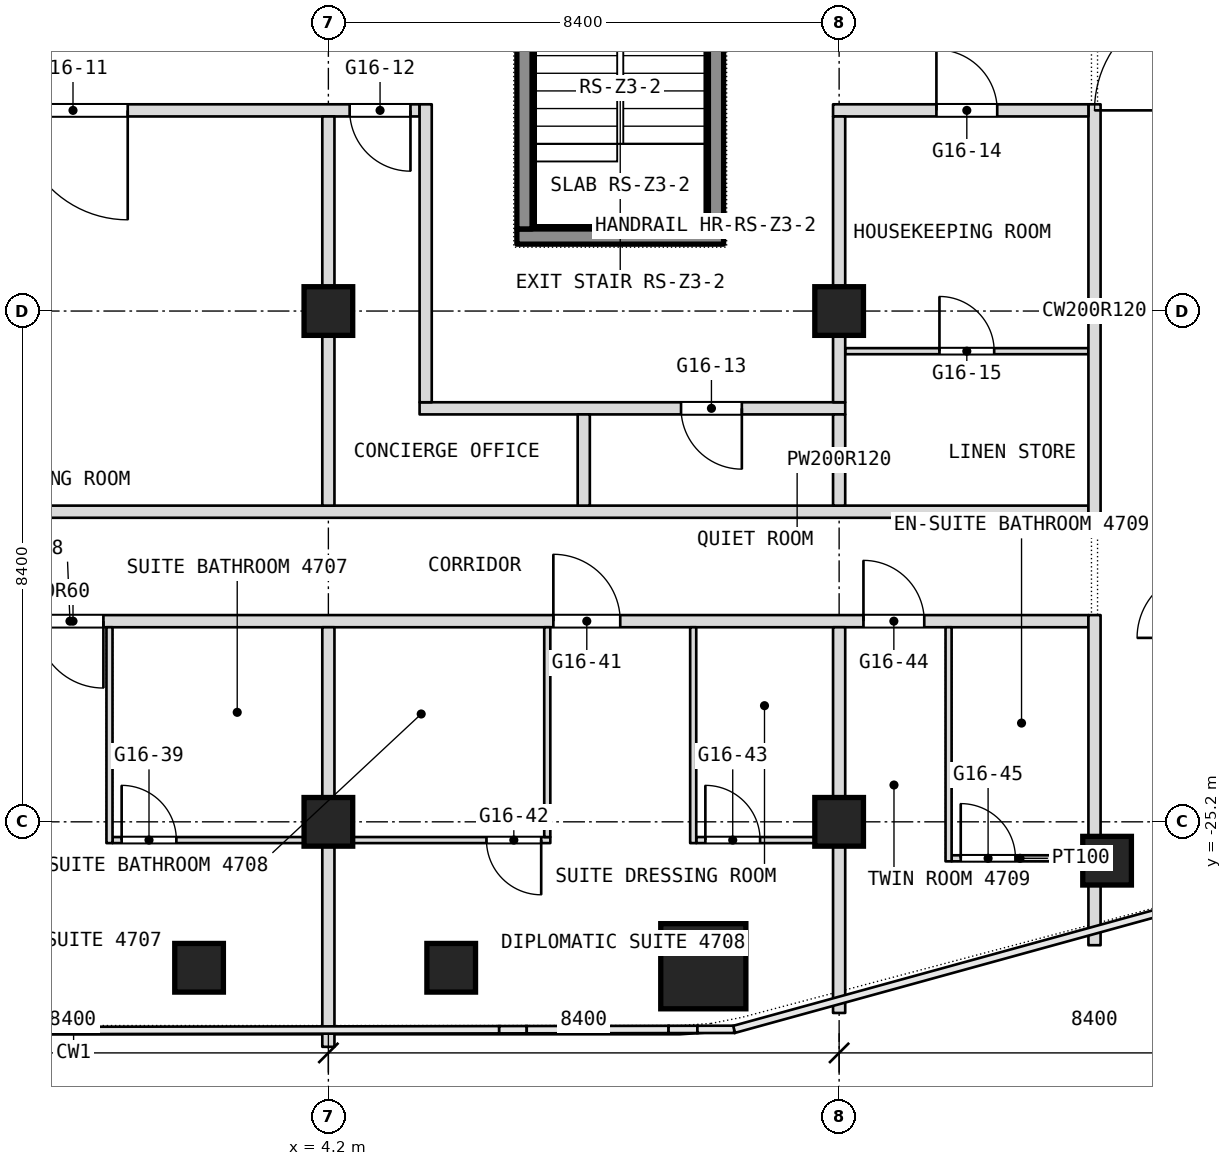
"""IFC4 building model, lengths in metres.
Left out: names, types, materials, properties, quantities, classifications, styles, units other than length and angle.
Written with IfcOpenShell. Run it as: python <this file> out.ifc"""

import sys

from ifc_helpers import new_model, si_unit, direction, frame, frame_2d, origin, origin_2d, place, context, subcontext, project, spatial, rectangle, extrude, element, fill, save


model = new_model("IFC4")
c1 = context("Model", 3, precision=1e-05, world=origin(), true_north=direction((0.0, 1.0)))
c2 = subcontext(c1, "Body", "Model", "MODEL_VIEW")
j1 = project(units=[si_unit("LENGTHUNIT", "METRE"), si_unit("PLANEANGLEUNIT", "RADIAN")], contexts=[c1])
p1 = place(None, origin())
s1 = spatial("IfcSite", under=j1, at=p1, CompositionType="ELEMENT")
p2 = place(p1, origin())
s2 = spatial("IfcBuilding", under=s1, at=p2, CompositionType="ELEMENT")
p3 = place(p2, frame((0.0, 0.0, 205.7)))
s3 = spatial("IfcBuildingStorey", under=s2, at=p3, CompositionType="ELEMENT", Elevation=205.7)
p4 = place(p3, frame((10.366, -27.575, 0.0), z_axis=(0.0, 0.0, 1.0), x_axis=(1.0, 0.0, 0.0)))
e1 = element("IfcColumn", 1, at=p4, inside=s3, PredefinedType="COLUMN", context=c2, shape_type="SweptSolid", body=[
    extrude(rectangle(XDim=1.4, YDim=1.4, at=origin_2d()), origin(), (0.0, 0.0, 1.0), 3.6),
])
for number, where, z_axis, x_axis in (
    (2, (4.2, -25.2, 0.0), (0.0, 0.0, 1.0), (1.0, 0.0, 0.0)),
    (3, (4.2, -16.8, 0.0), (0.0, 0.0, 1.0), (1.0, 0.0, 0.0)),
    (4, (12.6, -25.2, 0.0), (0.0, 0.0, 1.0), (1.0, 0.0, 0.0)),
    (5, (12.6, -16.8, 0.0), (0.0, 0.0, 1.0), (1.0, 0.0, 0.0)),
    (6, (17.007, -25.839, 0.0), (0.0, 0.0, 1.0), (1.0, 0.0, 0.0)),
    (7, (6.22, -27.6, 0.0), (0.0, 0.0, 1.0), (1.0, 0.0, 0.0)),
    (8, (2.073, -27.6, 0.0), (0.0, 0.0, 1.0), (1.0, 0.0, 0.0)),
):
    element("IfcColumn", number, at=place(p3, frame(where, z_axis=z_axis, x_axis=x_axis)), inside=s3, PredefinedType="COLUMN", context=c2, shape_type="SweptSolid", body=[
        extrude(rectangle(XDim=0.8, YDim=0.8, at=origin_2d()), origin(), (0.0, 0.0, 1.0), 3.6),
    ])
p5 = place(p3, frame((14.45, -25.8, 0.0), z_axis=(0.0, 0.0, 1.0), x_axis=(1.0, 0.0, 0.0)))
e9 = element("IfcWall", 9, at=p5, inside=s3, PredefinedType="PARTITIONING", context=c2, shape_type="SweptSolid", body=[
    extrude(rectangle(XDim=2.25, YDim=0.1, at=frame_2d((1.125, 0.0))), origin(), (0.0, 0.0, 1.0), 3.34),
])
p6 = place(p5, frame((0.15, 0.0, 0.0)))
e10 = element("IfcOpeningElement", 10, at=p6, cuts=e9, PredefinedType="OPENING", context=c2, shape_type="SweptSolid", body=[
    extrude(rectangle(XDim=0.9, YDim=2.1, at=frame_2d((0.45, 1.05))), frame((0.0, 0.05, 0.0), z_axis=(0.0, -1.0, 0.0), x_axis=(1.0, 0.0, 0.0)), (0.0, 0.0, 1.0), 0.1),
])
p7 = place(p3, frame((0.65, -25.5, 0.0), z_axis=(0.0, 0.0, 1.0), x_axis=(1.0, 0.0, 0.0)))
e11 = element("IfcWall", 11, at=p7, inside=s3, PredefinedType="PARTITIONING", context=c2, shape_type="SweptSolid", body=[
    extrude(rectangle(XDim=7.2, YDim=0.1, at=frame_2d((3.6, 0.0))), origin(), (0.0, 0.0, 1.0), 3.34),
])
p8 = place(p7, frame((0.15, 0.0, 0.0)))
e12 = element("IfcOpeningElement", 12, at=p8, cuts=e11, PredefinedType="OPENING", context=c2, shape_type="SweptSolid", body=[
    extrude(rectangle(XDim=0.9, YDim=2.1, at=frame_2d((0.45, 1.05))), frame((0.0, 0.05, 0.0), z_axis=(0.0, -1.0, 0.0), x_axis=(1.0, 0.0, 0.0)), (0.0, 0.0, 1.0), 0.1),
])
p9 = place(p7, frame((6.15, 0.0, 0.0)))
e13 = element("IfcOpeningElement", 13, at=p9, cuts=e11, PredefinedType="OPENING", context=c2, shape_type="SweptSolid", body=[
    extrude(rectangle(XDim=0.9, YDim=2.1, at=frame_2d((0.45, 1.05))), frame((0.0, 0.05, 0.0), z_axis=(0.0, -1.0, 0.0), x_axis=(1.0, 0.0, 0.0)), (0.0, 0.0, 1.0), 0.1),
])
p10 = place(p3, frame((10.25, -25.5, 0.0), z_axis=(0.0, 0.0, 1.0), x_axis=(1.0, 0.0, 0.0)))
e14 = element("IfcWall", 14, at=p10, inside=s3, PredefinedType="PARTITIONING", context=c2, shape_type="SweptSolid", body=[
    extrude(rectangle(XDim=2.45, YDim=0.1, at=frame_2d((1.225, 0.0))), origin(), (0.0, 0.0, 1.0), 3.34),
])
p11 = place(p10, frame((0.15, 0.0, 0.0)))
e15 = element("IfcOpeningElement", 15, at=p11, cuts=e14, PredefinedType="OPENING", context=c2, shape_type="SweptSolid", body=[
    extrude(rectangle(XDim=0.9, YDim=2.1, at=frame_2d((0.45, 1.05))), frame((0.0, 0.05, 0.0), z_axis=(0.0, -1.0, 0.0), x_axis=(1.0, 0.0, 0.0)), (0.0, 0.0, 1.0), 0.1),
])
p12 = place(p3, frame((-16.7, -21.9, 0.0), z_axis=(0.0, 0.0, 1.0), x_axis=(1.0, 0.0, 0.0)))
e16 = element("IfcWall", 16, at=p12, inside=s3, PredefinedType="PARTITIONING", context=c2, shape_type="SweptSolid", body=[
    extrude(rectangle(XDim=33.4, YDim=0.2, at=frame_2d((16.7, 0.0))), origin(), (0.0, 0.0, 1.0), 3.34),
])
p13 = place(p12, frame((0.3, 0.0, 0.0)))
e17 = element("IfcOpeningElement", 17, at=p13, cuts=e16, PredefinedType="OPENING", context=c2, shape_type="SweptSolid", body=[
    extrude(rectangle(XDim=1.0, YDim=2.1, at=frame_2d((0.5, 1.05))), frame((0.0, 0.1, 0.0), z_axis=(0.0, -1.0, 0.0), x_axis=(1.0, 0.0, 0.0)), (0.0, 0.0, 1.0), 0.2),
])
p14 = place(p12, frame((9.85, 0.0, 0.0)))
e18 = element("IfcOpeningElement", 18, at=p14, cuts=e16, PredefinedType="OPENING", context=c2, shape_type="SweptSolid", body=[
    extrude(rectangle(XDim=1.1, YDim=2.1, at=frame_2d((0.55, 1.05))), frame((0.0, 0.1, 0.0), z_axis=(0.0, -1.0, 0.0), x_axis=(1.0, 0.0, 0.0)), (0.0, 0.0, 1.0), 0.2),
])
p15 = place(p12, frame((16.1, 0.0, 0.0)))
e19 = element("IfcOpeningElement", 19, at=p15, cuts=e16, PredefinedType="OPENING", context=c2, shape_type="SweptSolid", body=[
    extrude(rectangle(XDim=1.1, YDim=2.1, at=frame_2d((0.55, 1.05))), frame((0.0, 0.1, 0.0), z_axis=(0.0, -1.0, 0.0), x_axis=(1.0, 0.0, 0.0)), (0.0, 0.0, 1.0), 0.2),
])
p16 = place(p12, frame((24.6, 0.0, 0.0)))
e20 = element("IfcOpeningElement", 20, at=p16, cuts=e16, PredefinedType="OPENING", context=c2, shape_type="SweptSolid", body=[
    extrude(rectangle(XDim=1.1, YDim=2.1, at=frame_2d((0.55, 1.05))), frame((0.0, 0.1, 0.0), z_axis=(0.0, -1.0, 0.0), x_axis=(1.0, 0.0, 0.0)), (0.0, 0.0, 1.0), 0.2),
])
p17 = place(p12, frame((29.7, 0.0, 0.0)))
e21 = element("IfcOpeningElement", 21, at=p17, cuts=e16, PredefinedType="OPENING", context=c2, shape_type="SweptSolid", body=[
    extrude(rectangle(XDim=1.0, YDim=2.1, at=frame_2d((0.5, 1.05))), frame((0.0, 0.1, 0.0), z_axis=(0.0, -1.0, 0.0), x_axis=(1.0, 0.0, 0.0)), (0.0, 0.0, 1.0), 0.2),
])
p18 = place(p3, frame((-4.1, -20.1, 0.0), z_axis=(0.0, 0.0, 1.0), x_axis=(1.0, 0.0, 0.0)))
e22 = element("IfcWall", 22, at=p18, inside=s3, PredefinedType="PARTITIONING", context=c2, shape_type="SweptSolid", body=[
    extrude(rectangle(XDim=20.8, YDim=0.2, at=frame_2d((10.4, 0.0))), origin(), (0.0, 0.0, 1.0), 3.34),
])
p19 = place(p3, frame((5.7, -18.4, 0.0), z_axis=(0.0, 0.0, 1.0), x_axis=(1.0, 0.0, 0.0)))
e23 = element("IfcWall", 23, at=p19, inside=s3, PredefinedType="PARTITIONING", context=c2, shape_type="SweptSolid", body=[
    extrude(rectangle(XDim=7.0, YDim=0.2, at=frame_2d((3.5, 0.0))), origin(), (0.0, 0.0, 1.0), 3.34),
])
p20 = place(p19, frame((4.3, 0.0, 0.0)))
e24 = element("IfcOpeningElement", 24, at=p20, cuts=e23, PredefinedType="OPENING", context=c2, shape_type="SweptSolid", body=[
    extrude(rectangle(XDim=1.0, YDim=2.1, at=frame_2d((0.5, 1.05))), frame((0.0, 0.1, 0.0), z_axis=(0.0, -1.0, 0.0), x_axis=(1.0, 0.0, 0.0)), (0.0, 0.0, 1.0), 0.2),
])
p21 = place(p3, frame((12.7, -17.46, 0.0), z_axis=(0.0, 0.0, 1.0), x_axis=(1.0, 0.0, 0.0)))
e25 = element("IfcWall", 25, at=p21, inside=s3, PredefinedType="PARTITIONING", context=c2, shape_type="SweptSolid", body=[
    extrude(rectangle(XDim=4.0, YDim=0.1, at=frame_2d((2.0, 0.0))), origin(), (0.0, 0.0, 1.0), 3.34),
])
p22 = place(p21, frame((1.55, 0.0, 0.0)))
e26 = element("IfcOpeningElement", 26, at=p22, cuts=e25, PredefinedType="OPENING", context=c2, shape_type="SweptSolid", body=[
    extrude(rectangle(XDim=0.9, YDim=2.1, at=frame_2d((0.45, 1.05))), frame((0.0, 0.05, 0.0), z_axis=(0.0, -1.0, 0.0), x_axis=(1.0, 0.0, 0.0)), (0.0, 0.0, 1.0), 0.1),
])
p23 = place(p3, frame((16.8, -27.229, 0.0), z_axis=(0.0, 0.0, 1.0), x_axis=(0.0, 1.0, 0.0)))
e27 = element("IfcWall", 27, at=p23, inside=s3, PredefinedType="PARTITIONING", context=c2, shape_type="SweptSolid", body=[
    extrude(rectangle(XDim=5.429, YDim=0.2, at=frame_2d((2.714, 0.0))), origin(), (0.0, 0.0, 1.0), 3.34),
])
p24 = place(p3, frame((16.8, -20.2, 0.0), z_axis=(0.0, 0.0, 1.0), x_axis=(0.0, 1.0, 0.0)))
e28 = element("IfcWall", 28, at=p24, inside=s3, PredefinedType="PARTITIONING", context=c2, shape_type="SweptSolid", body=[
    extrude(rectangle(XDim=6.8, YDim=0.2, at=frame_2d((3.4, 0.0))), origin(), (0.0, 0.0, 1.0), 3.34),
])
p25 = place(p3, frame((14.4, -25.85, 0.0), z_axis=(0.0, 0.0, 1.0), x_axis=(0.0, 1.0, 0.0)))
e29 = element("IfcWall", 29, at=p25, inside=s3, PredefinedType="PARTITIONING", context=c2, shape_type="SweptSolid", body=[
    extrude(rectangle(XDim=3.85, YDim=0.1, at=frame_2d((1.925, 0.0))), origin(), (0.0, 0.0, 1.0), 3.34),
])
p26 = place(p3, frame((-4.3, -13.5, 0.0), z_axis=(0.0, 0.0, 1.0), x_axis=(1.0, 0.0, 0.0)))
e30 = element("IfcWall", 30, at=p26, inside=s3, PredefinedType="PARTITIONING", context=c2, shape_type="SweptSolid", body=[
    extrude(rectangle(XDim=10.0, YDim=0.2, at=frame_2d((5.0, 0.0))), origin(), (0.0, 0.0, 1.0), 3.34),
])
p27 = place(p26, frame((3.4, 0.0, 0.0)))
e31 = element("IfcOpeningElement", 31, at=p27, cuts=e30, PredefinedType="OPENING", context=c2, shape_type="SweptSolid", body=[
    extrude(rectangle(XDim=1.8, YDim=2.1, at=frame_2d((0.9, 1.05))), frame((0.0, 0.1, 0.0), z_axis=(0.0, -1.0, 0.0), x_axis=(1.0, 0.0, 0.0)), (0.0, 0.0, 1.0), 0.2),
])
p28 = place(p26, frame((8.85, 0.0, 0.0)))
e32 = element("IfcOpeningElement", 32, at=p28, cuts=e30, PredefinedType="OPENING", context=c2, shape_type="SweptSolid", body=[
    extrude(rectangle(XDim=1.0, YDim=2.1, at=frame_2d((0.5, 1.05))), frame((0.0, 0.1, 0.0), z_axis=(0.0, -1.0, 0.0), x_axis=(1.0, 0.0, 0.0)), (0.0, 0.0, 1.0), 0.2),
])
p29 = place(p3, frame((12.5, -13.5, 0.0), z_axis=(0.0, 0.0, 1.0), x_axis=(1.0, 0.0, 0.0)))
e33 = element("IfcWall", 33, at=p29, inside=s3, PredefinedType="PARTITIONING", context=c2, shape_type="SweptSolid", body=[
    extrude(rectangle(XDim=4.2, YDim=0.2, at=frame_2d((2.1, 0.0))), origin(), (0.0, 0.0, 1.0), 3.34),
])
p30 = place(p29, frame((1.7, 0.0, 0.0)))
e34 = element("IfcOpeningElement", 34, at=p30, cuts=e33, PredefinedType="OPENING", context=c2, shape_type="SweptSolid", body=[
    extrude(rectangle(XDim=1.0, YDim=2.1, at=frame_2d((0.5, 1.05))), frame((0.0, 0.1, 0.0), z_axis=(0.0, -1.0, 0.0), x_axis=(1.0, 0.0, 0.0)), (0.0, 0.0, 1.0), 0.2),
])
p31 = place(p3, frame((12.6, -28.343, 0.0), z_axis=(0.0, 0.0, 1.0), x_axis=(0.0, 1.0, 0.0)))
e35 = element("IfcWall", 35, at=p31, inside=s3, PredefinedType="PARTITIONING", context=c2, shape_type="SweptSolid", body=[
    extrude(rectangle(XDim=6.343, YDim=0.2, at=frame_2d((3.171, 0.0))), origin(), (0.0, 0.0, 1.0), 3.34),
])
p32 = place(p3, frame((12.6, -20.0, 0.0), z_axis=(0.0, 0.0, 1.0), x_axis=(0.0, 1.0, 0.0)))
e36 = element("IfcWall", 36, at=p32, inside=s3, PredefinedType="PARTITIONING", context=c2, shape_type="SweptSolid", body=[
    extrude(rectangle(XDim=1.5, YDim=0.2, at=frame_2d((0.75, 0.0))), origin(), (0.0, 0.0, 1.0), 3.34),
])
p33 = place(p3, frame((12.6, -18.3, 0.0), z_axis=(0.0, 0.0, 1.0), x_axis=(0.0, 1.0, 0.0)))
e37 = element("IfcWall", 37, at=p33, inside=s3, PredefinedType="PARTITIONING", context=c2, shape_type="SweptSolid", body=[
    extrude(rectangle(XDim=4.7, YDim=0.2, at=frame_2d((2.35, 0.0))), origin(), (0.0, 0.0, 1.0), 3.34),
])
p34 = place(p3, frame((10.2, -25.55, 0.0), z_axis=(0.0, 0.0, 1.0), x_axis=(0.0, 1.0, 0.0)))
e38 = element("IfcWall", 38, at=p34, inside=s3, PredefinedType="PARTITIONING", context=c2, shape_type="SweptSolid", body=[
    extrude(rectangle(XDim=3.55, YDim=0.1, at=frame_2d((1.775, 0.0))), origin(), (0.0, 0.0, 1.0), 3.34),
])
p35 = place(p3, frame((8.4, -20.0, 0.0), z_axis=(0.0, 0.0, 1.0), x_axis=(0.0, 1.0, 0.0)))
e39 = element("IfcWall", 39, at=p35, inside=s3, PredefinedType="PARTITIONING", context=c2, shape_type="SweptSolid", body=[
    extrude(rectangle(XDim=1.5, YDim=0.2, at=frame_2d((0.75, 0.0))), origin(), (0.0, 0.0, 1.0), 3.34),
])
p36 = place(p3, frame((7.8, -25.45, 0.0), z_axis=(0.0, 0.0, 1.0), x_axis=(0.0, 1.0, 0.0)))
e40 = element("IfcWall", 40, at=p36, inside=s3, PredefinedType="PARTITIONING", context=c2, shape_type="SweptSolid", body=[
    extrude(rectangle(XDim=3.45, YDim=0.1, at=frame_2d((1.725, 0.0))), origin(), (0.0, 0.0, 1.0), 3.34),
])
p37 = place(p3, frame((5.8, -18.3, 0.0), z_axis=(0.0, 0.0, 1.0), x_axis=(0.0, 1.0, 0.0)))
e41 = element("IfcWall", 41, at=p37, inside=s3, PredefinedType="PARTITIONING", context=c2, shape_type="SweptSolid", body=[
    extrude(rectangle(XDim=4.9, YDim=0.2, at=frame_2d((2.45, 0.0))), origin(), (0.0, 0.0, 1.0), 3.34),
])
p38 = place(p3, frame((4.2, -28.9, 0.0), z_axis=(0.0, 0.0, 1.0), x_axis=(0.0, 1.0, 0.0)))
e42 = element("IfcWall", 42, at=p38, inside=s3, PredefinedType="PARTITIONING", context=c2, shape_type="SweptSolid", body=[
    extrude(rectangle(XDim=6.9, YDim=0.2, at=frame_2d((3.45, 0.0))), origin(), (0.0, 0.0, 1.0), 3.34),
])
p39 = place(p3, frame((4.2, -20.0, 0.0), z_axis=(0.0, 0.0, 1.0), x_axis=(0.0, 1.0, 0.0)))
e43 = element("IfcWall", 43, at=p39, inside=s3, PredefinedType="PARTITIONING", context=c2, shape_type="SweptSolid", body=[
    extrude(rectangle(XDim=6.4, YDim=0.2, at=frame_2d((3.2, 0.0))), origin(), (0.0, 0.0, 1.0), 3.34),
])
p40 = place(p3, frame((0.6, -25.55, 0.0), z_axis=(0.0, 0.0, 1.0), x_axis=(0.0, 1.0, 0.0)))
e44 = element("IfcWall", 44, at=p40, inside=s3, PredefinedType="PARTITIONING", context=c2, shape_type="SweptSolid", body=[
    extrude(rectangle(XDim=3.55, YDim=0.1, at=frame_2d((1.775, 0.0))), origin(), (0.0, 0.0, 1.0), 3.34),
])
p41 = place(p3, frame((7.3, -15.575, 0.1), z_axis=(0.0, 0.0, 1.0), x_axis=(1.0, 0.0, 0.0)))
e45 = element("IfcWall", 45, at=p41, inside=s3, PredefinedType="SHEAR", context=c2, shape_type="SweptSolid", body=[
    extrude(rectangle(XDim=3.4, YDim=0.25, at=frame_2d((1.7, 0.0))), origin(), (0.0, 0.0, 1.0), 3.6),
])
for number, where, z_axis, x_axis in (
    (46, (7.425, -15.45, 0.1), (0.0, 0.0, 1.0), (0.0, 1.0, 0.0)),
    (47, (10.575, -15.45, 0.1), (0.0, 0.0, 1.0), (0.0, 1.0, 0.0)),
):
    element("IfcWall", number, at=place(p3, frame(where, z_axis=z_axis, x_axis=x_axis)), inside=s3, PredefinedType="SHEAR", context=c2, shape_type="SweptSolid", body=[
        extrude(rectangle(XDim=5.7, YDim=0.25, at=frame_2d((2.85, 0.0))), origin(), (0.0, 0.0, 1.0), 3.6),
    ])
p42 = place(p6, origin())
e48 = element("IfcDoor", 48, at=p42, inside=s3, OperationType="SINGLE_SWING_LEFT", PredefinedType="DOOR", context=c2, shape_type="SweptSolid", body=[
    extrude(rectangle(XDim=0.9, YDim=2.1, at=frame_2d((0.45, 1.05))), frame((0.0, 0.025, 0.0), z_axis=(0.0, -1.0, 0.0), x_axis=(1.0, 0.0, 0.0)), (0.0, 0.0, 1.0), 0.05),
])
fill(e10, e48)
p43 = place(p8, origin())
e49 = element("IfcDoor", 49, at=p43, inside=s3, OperationType="SINGLE_SWING_LEFT", PredefinedType="DOOR", context=c2, shape_type="SweptSolid", body=[
    extrude(rectangle(XDim=0.9, YDim=2.1, at=frame_2d((0.45, 1.05))), frame((0.0, 0.025, 0.0), z_axis=(0.0, -1.0, 0.0), x_axis=(1.0, 0.0, 0.0)), (0.0, 0.0, 1.0), 0.05),
])
fill(e12, e49)
p44 = place(p9, origin())
e50 = element("IfcDoor", 50, at=p44, inside=s3, OperationType="SINGLE_SWING_RIGHT", PredefinedType="DOOR", context=c2, shape_type="SweptSolid", body=[
    extrude(rectangle(XDim=0.9, YDim=2.1, at=frame_2d((0.45, 1.05))), frame((0.0, 0.025, 0.0), z_axis=(0.0, -1.0, 0.0), x_axis=(1.0, 0.0, 0.0)), (0.0, 0.0, 1.0), 0.05),
])
fill(e13, e50)
p45 = place(p11, origin())
e51 = element("IfcDoor", 51, at=p45, inside=s3, OperationType="SINGLE_SWING_LEFT", PredefinedType="DOOR", context=c2, shape_type="SweptSolid", body=[
    extrude(rectangle(XDim=0.9, YDim=2.1, at=frame_2d((0.45, 1.05))), frame((0.0, 0.025, 0.0), z_axis=(0.0, -1.0, 0.0), x_axis=(1.0, 0.0, 0.0)), (0.0, 0.0, 1.0), 0.05),
])
fill(e15, e51)
p46 = place(p15, origin())
e52 = element("IfcDoor", 52, at=p46, inside=s3, OperationType="SINGLE_SWING_LEFT", PredefinedType="DOOR", context=c2, shape_type="SweptSolid", body=[
    extrude(rectangle(XDim=1.1, YDim=2.1, at=frame_2d((0.55, 1.05))), frame((0.0, 0.025, 0.0), z_axis=(0.0, -1.0, 0.0), x_axis=(1.0, 0.0, 0.0)), (0.0, 0.0, 1.0), 0.05),
])
fill(e19, e52)
p47 = place(p16, origin())
e53 = element("IfcDoor", 53, at=p47, inside=s3, OperationType="SINGLE_SWING_RIGHT", PredefinedType="DOOR", context=c2, shape_type="SweptSolid", body=[
    extrude(rectangle(XDim=1.1, YDim=2.1, at=frame_2d((0.55, 1.05))), frame((0.0, 0.025, 0.0), z_axis=(0.0, -1.0, 0.0), x_axis=(1.0, 0.0, 0.0)), (0.0, 0.0, 1.0), 0.05),
])
fill(e20, e53)
p48 = place(p17, origin())
e54 = element("IfcDoor", 54, at=p48, inside=s3, OperationType="SINGLE_SWING_RIGHT", PredefinedType="DOOR", context=c2, shape_type="SweptSolid", body=[
    extrude(rectangle(XDim=1.0, YDim=2.1, at=frame_2d((0.5, 1.05))), frame((0.0, 0.025, 0.0), z_axis=(0.0, -1.0, 0.0), x_axis=(1.0, 0.0, 0.0)), (0.0, 0.0, 1.0), 0.05),
])
fill(e21, e54)
p49 = place(p20, origin())
e55 = element("IfcDoor", 55, at=p49, inside=s3, OperationType="SINGLE_SWING_RIGHT", PredefinedType="DOOR", context=c2, shape_type="SweptSolid", body=[
    extrude(rectangle(XDim=1.0, YDim=2.1, at=frame_2d((0.5, 1.05))), frame((0.0, 0.025, 0.0), z_axis=(0.0, -1.0, 0.0), x_axis=(1.0, 0.0, 0.0)), (0.0, 0.0, 1.0), 0.05),
])
fill(e24, e55)
p50 = place(p22, origin())
e56 = element("IfcDoor", 56, at=p50, inside=s3, OperationType="SINGLE_SWING_RIGHT", PredefinedType="DOOR", context=c2, shape_type="SweptSolid", body=[
    extrude(rectangle(XDim=0.9, YDim=2.1, at=frame_2d((0.45, 1.05))), frame((0.0, 0.025, 0.0), z_axis=(0.0, -1.0, 0.0), x_axis=(1.0, 0.0, 0.0)), (0.0, 0.0, 1.0), 0.05),
])
fill(e26, e56)
p51 = place(p27, origin())
e57 = element("IfcDoor", 57, at=p51, inside=s3, OperationType="DOUBLE_DOOR_SINGLE_SWING", PredefinedType="DOOR", context=c2, shape_type="SweptSolid", body=[
    extrude(rectangle(XDim=1.8, YDim=2.1, at=frame_2d((0.9, 1.05))), frame((0.0, 0.025, 0.0), z_axis=(0.0, -1.0, 0.0), x_axis=(1.0, 0.0, 0.0)), (0.0, 0.0, 1.0), 0.05),
])
fill(e31, e57)
p52 = place(p28, origin())
e58 = element("IfcDoor", 58, at=p52, inside=s3, OperationType="SINGLE_SWING_LEFT", PredefinedType="DOOR", context=c2, shape_type="SweptSolid", body=[
    extrude(rectangle(XDim=1.0, YDim=2.1, at=frame_2d((0.5, 1.05))), frame((0.0, 0.025, 0.0), z_axis=(0.0, -1.0, 0.0), x_axis=(1.0, 0.0, 0.0)), (0.0, 0.0, 1.0), 0.05),
])
fill(e32, e58)
p53 = place(p30, origin())
e59 = element("IfcDoor", 59, at=p53, inside=s3, OperationType="SINGLE_SWING_RIGHT", PredefinedType="DOOR", context=c2, shape_type="SweptSolid", body=[
    extrude(rectangle(XDim=1.0, YDim=2.1, at=frame_2d((0.5, 1.05))), frame((0.0, 0.025, 0.0), z_axis=(0.0, -1.0, 0.0), x_axis=(1.0, 0.0, 0.0)), (0.0, 0.0, 1.0), 0.05),
])
fill(e34, e59)
save(model, sys.argv[1])
